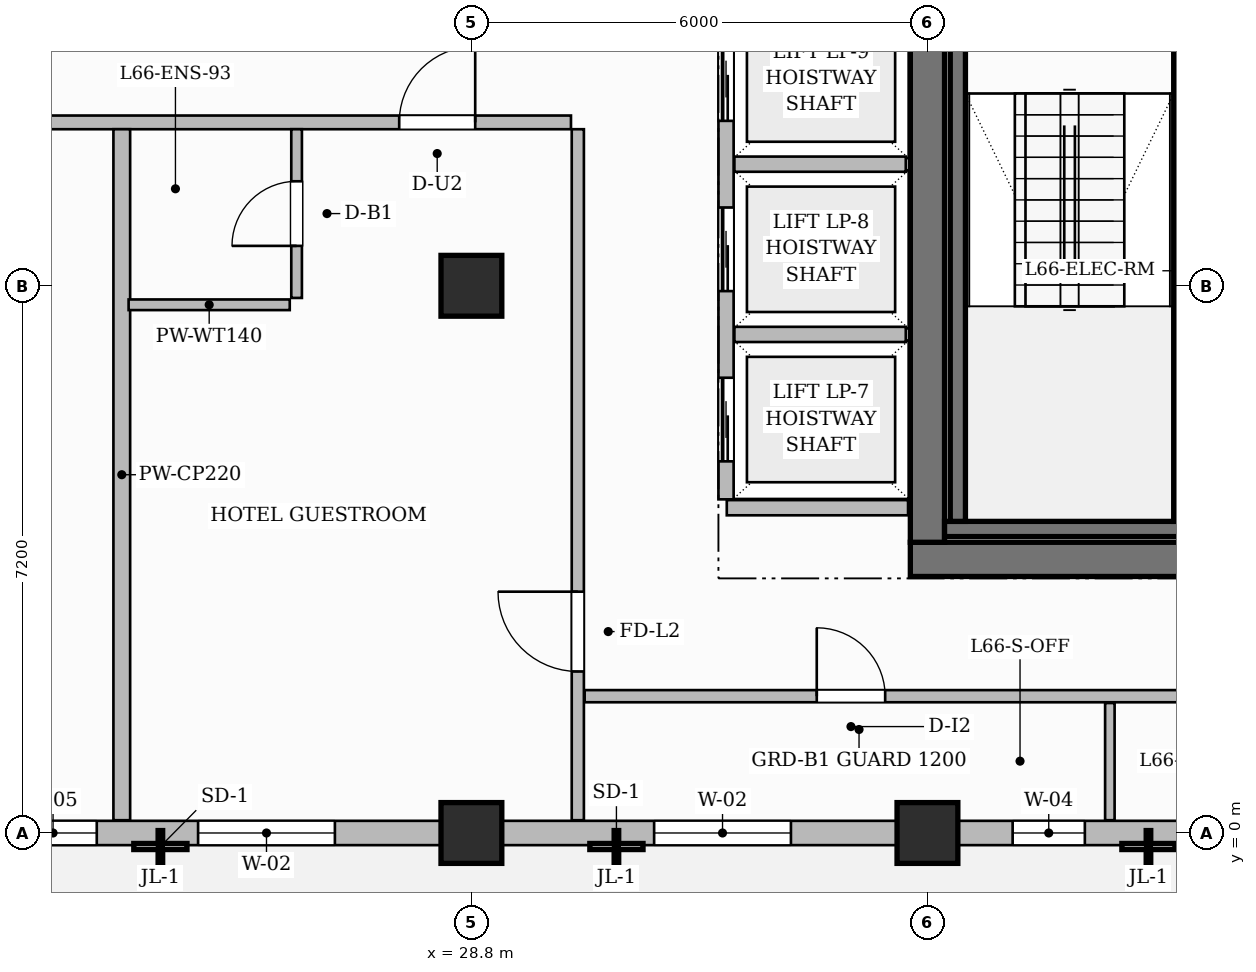
"""IFC4 building model, lengths in metres.
Left out: names, types, materials, properties, quantities, classifications, styles, units other than length and angle.
Written with IfcOpenShell. Run it as: python <this file> out.ifc"""

import sys

from ifc_helpers import new_model, si_unit, direction, frame, frame_2d, origin, origin_2d, place, context, subcontext, project, spatial, rectangle, extrude, source, transform, mapped, element, fill, save


model = new_model("IFC4")
c1 = context("Model", 3, precision=1e-05, world=origin(), true_north=direction((0.0, 1.0)))
c2 = subcontext(c1, "Body", "Model", "MODEL_VIEW")
j1 = project(units=[si_unit("LENGTHUNIT", "METRE"), si_unit("PLANEANGLEUNIT", "RADIAN")], contexts=[c1])
p1 = place(None, origin())
s1 = spatial("IfcSite", under=j1, at=p1, CompositionType="ELEMENT")
p2 = place(p1, origin())
s2 = spatial("IfcBuilding", under=s1, at=p2, CompositionType="ELEMENT")
p3 = place(p2, frame((0.0, 0.0, 263.5)))
s3 = spatial("IfcBuildingStorey", under=s2, at=p3, CompositionType="ELEMENT", Elevation=263.5)
p4 = place(p3, frame((34.575, 3.6, 0.0), z_axis=(0.0, 0.0, 1.0), x_axis=(1.0, 0.0, 0.0)))
e1 = element("IfcWall", 1, at=p4, inside=s3, PredefinedType="SHEAR", context=c2, shape_type="SweptSolid", body=[
    extrude(rectangle(XDim=15.45, YDim=0.45, at=frame_2d((7.725, 0.0))), origin(), (0.0, 0.0, 1.0), 3.85),
])
p5 = place(p4, frame((4.425, 0.0, 0.0)))
e2 = element("IfcOpeningElement", 2, at=p5, cuts=e1, PredefinedType="OPENING", context=c2, shape_type="SweptSolid", body=[
    extrude(rectangle(XDim=0.9, YDim=2.1, at=frame_2d((0.45, 1.05))), frame((0.0, 0.235, 0.0), z_axis=(0.0, -1.0, 0.0), x_axis=(1.0, 0.0, 0.0)), (0.0, 0.0, 1.0), 0.47),
])
p6 = place(p4, frame((6.875, 0.0, 0.0)))
e3 = element("IfcOpeningElement", 3, at=p6, cuts=e1, PredefinedType="OPENING", context=c2, shape_type="SweptSolid", body=[
    extrude(rectangle(XDim=0.9, YDim=2.1, at=frame_2d((0.45, 1.05))), frame((0.0, 0.235, 0.0), z_axis=(0.0, -1.0, 0.0), x_axis=(1.0, 0.0, 0.0)), (0.0, 0.0, 1.0), 0.47),
])
p7 = place(p3, frame((34.8, 3.825, 0.0), z_axis=(0.0, 0.0, 1.0), x_axis=(0.0, 1.0, 0.0)))
e4 = element("IfcWall", 4, at=p7, inside=s3, PredefinedType="SHEAR", context=c2, shape_type="SweptSolid", body=[
    extrude(rectangle(XDim=10.35, YDim=0.45, at=frame_2d((5.175, 0.0))), origin(), (0.0, 0.0, 1.0), 3.85),
])
m1 = source(origin(), c2, "Body", "SweptSolid", [
    extrude(rectangle(XDim=0.8, YDim=0.8, at=origin_2d()), origin(), (0.0, 0.0, 1.0), 3.85),
])
for number, where, z_axis, x_axis in (
    (5, (28.8, 0.0, 0.0), (0.0, 0.0, 1.0), (1.0, 0.0, 0.0)),
    (6, (28.8, 7.2, 0.0), (0.0, 0.0, 1.0), (1.0, 0.0, 0.0)),
    (7, (34.8, 0.0, 0.0), (0.0, 0.0, 1.0), (1.0, 0.0, 0.0)),
):
    element("IfcColumn", number, at=place(p3, frame(where, z_axis=z_axis, x_axis=x_axis)), inside=s3, PredefinedType="COLUMN", context=c2, shape_type="MappedRepresentation", body=[
        mapped(m1, transform((0.0, 0.0, 0.0), scale=1.0)),
    ])
p8 = place(p3, frame((35.025, 4.0, 0.0), z_axis=(0.0, 0.0, 1.0), x_axis=(1.0, 0.0, 0.0)))
e8 = element("IfcWall", 8, at=p8, inside=s3, PredefinedType="SHEAR", context=c2, shape_type="SweptSolid", body=[
    extrude(rectangle(XDim=3.215, YDim=0.2, at=frame_2d((1.607, 0.0))), origin(), (0.0, 0.0, 1.0), 3.85),
])
for number, where, z_axis, x_axis in (
    (9, (35.2, 4.1, 0.0), (0.0, 0.0, 1.0), (0.0, 1.0, 0.0)),
    (10, (38.14, 4.1, 0.0), (0.0, 0.0, 1.0), (0.0, 1.0, 0.0)),
):
    element("IfcWall", number, at=place(p3, frame(where, z_axis=z_axis, x_axis=x_axis)), inside=s3, PredefinedType="SHEAR", context=c2, shape_type="SweptSolid", body=[
        extrude(rectangle(XDim=6.95, YDim=0.2, at=frame_2d((3.475, 0.0))), origin(), (0.0, 0.0, 1.0), 3.85),
    ])
p9 = place(p3, frame((32.16, 4.28, 0.0), z_axis=(0.0, 0.0, 1.0), x_axis=(1.0, 0.0, 0.0)))
e11 = element("IfcWall", 11, at=p9, inside=s3, PredefinedType="PARTITIONING", context=c2, shape_type="SweptSolid", body=[
    extrude(rectangle(XDim=2.385, YDim=0.2, at=frame_2d((1.192, 0.0))), origin(), (0.0, 0.0, 1.0), 3.6),
])
p10 = place(p3, frame((32.15, 4.39, 0.0), z_axis=(0.0, 0.0, 1.0), x_axis=(0.0, 1.0, 0.0)))
e12 = element("IfcWall", 12, at=p10, inside=s3, PredefinedType="PARTITIONING", context=c2, shape_type="SweptSolid", body=[
    extrude(rectangle(XDim=8.82, YDim=0.2, at=frame_2d((4.41, 0.0))), origin(), (0.0, 0.0, 1.0), 3.6),
])
p11 = place(p10, frame((0.5, 0.0, 0.0)))
e13 = element("IfcOpeningElement", 13, at=p11, cuts=e12, PredefinedType="OPENING", context=c2, shape_type="SweptSolid", body=[
    extrude(rectangle(XDim=1.1, YDim=2.2, at=frame_2d((0.55, 1.1))), frame((0.0, 0.11, 0.0), z_axis=(0.0, -1.0, 0.0), x_axis=(1.0, 0.0, 0.0)), (0.0, 0.0, 1.0), 0.22),
])
p12 = place(p10, frame((2.74, 0.0, 0.0)))
e14 = element("IfcOpeningElement", 14, at=p12, cuts=e12, PredefinedType="OPENING", context=c2, shape_type="SweptSolid", body=[
    extrude(rectangle(XDim=1.1, YDim=2.2, at=frame_2d((0.55, 1.1))), frame((0.0, 0.11, 0.0), z_axis=(0.0, -1.0, 0.0), x_axis=(1.0, 0.0, 0.0)), (0.0, 0.0, 1.0), 0.22),
])
p13 = place(p10, frame((4.98, 0.0, 0.0)))
e15 = element("IfcOpeningElement", 15, at=p13, cuts=e12, PredefinedType="OPENING", context=c2, shape_type="SweptSolid", body=[
    extrude(rectangle(XDim=1.1, YDim=2.2, at=frame_2d((0.55, 1.1))), frame((0.0, 0.11, 0.0), z_axis=(0.0, -1.0, 0.0), x_axis=(1.0, 0.0, 0.0)), (0.0, 0.0, 1.0), 0.22),
])
p14 = place(p10, frame((7.22, 0.0, 0.0)))
e16 = element("IfcOpeningElement", 16, at=p14, cuts=e12, PredefinedType="OPENING", context=c2, shape_type="SweptSolid", body=[
    extrude(rectangle(XDim=1.1, YDim=2.2, at=frame_2d((0.55, 1.1))), frame((0.0, 0.11, 0.0), z_axis=(0.0, -1.0, 0.0), x_axis=(1.0, 0.0, 0.0)), (0.0, 0.0, 1.0), 0.22),
])
for number, where, z_axis, x_axis in (
    (17, (32.26, 6.56, 0.0), (0.0, 0.0, 1.0), (1.0, 0.0, 0.0)),
    (18, (32.26, 8.8, 0.0), (0.0, 0.0, 1.0), (1.0, 0.0, 0.0)),
):
    element("IfcWall", number, at=place(p3, frame(where, z_axis=z_axis, x_axis=x_axis)), inside=s3, PredefinedType="PARTITIONING", context=c2, shape_type="SweptSolid", body=[
        extrude(rectangle(XDim=2.255, YDim=0.2, at=frame_2d((1.127, 0.0))), origin(), (0.0, 0.0, 1.0), 3.6),
    ])
p15 = place(p3, frame((18.168, 9.35, 0.0), z_axis=(0.0, 0.0, 1.0), x_axis=(1.0, 0.0, 0.0)))
e19 = element("IfcWall", 19, at=p15, inside=s3, PredefinedType="PARTITIONING", context=c2, shape_type="SweptSolid", body=[
    extrude(rectangle(XDim=11.942, YDim=0.18, at=frame_2d((5.971, 0.0))), origin(), (0.0, 0.0, 1.0), 3.6),
])
p16 = place(p15, frame((3.632, 0.0, 0.0)))
e20 = element("IfcOpeningElement", 20, at=p16, cuts=e19, PredefinedType="OPENING", context=c2, shape_type="SweptSolid", body=[
    extrude(rectangle(XDim=1.05, YDim=2.25, at=frame_2d((0.525, 1.125))), frame((0.0, 0.1, 0.0), z_axis=(0.0, -1.0, 0.0), x_axis=(1.0, 0.0, 0.0)), (0.0, 0.0, 1.0), 0.2),
])
p17 = place(p15, frame((9.682, 0.0, 0.0)))
e21 = element("IfcOpeningElement", 21, at=p17, cuts=e19, PredefinedType="OPENING", context=c2, shape_type="SweptSolid", body=[
    extrude(rectangle(XDim=1.0, YDim=2.2, at=frame_2d((0.5, 1.1))), frame((0.0, 0.1, 0.0), z_axis=(0.0, -1.0, 0.0), x_axis=(1.0, 0.0, 0.0)), (0.0, 0.0, 1.0), 0.2),
])
p18 = place(p3, frame((30.2, 0.168, 0.0), z_axis=(0.0, 0.0, 1.0), x_axis=(0.0, 1.0, 0.0)))
e22 = element("IfcWall", 22, at=p18, inside=s3, PredefinedType="PARTITIONING", context=c2, shape_type="SweptSolid", body=[
    extrude(rectangle(XDim=9.092, YDim=0.16, at=frame_2d((4.546, 0.0))), origin(), (0.0, 0.0, 1.0), 3.6),
])
p19 = place(p18, frame((1.957, 0.0, 0.0)))
e23 = element("IfcOpeningElement", 23, at=p19, cuts=e22, PredefinedType="OPENING", context=c2, shape_type="SweptSolid", body=[
    extrude(rectangle(XDim=1.05, YDim=2.15, at=frame_2d((0.525, 1.075))), frame((0.0, 0.09, 0.0), z_axis=(0.0, -1.0, 0.0), x_axis=(1.0, 0.0, 0.0)), (0.0, 0.0, 1.0), 0.18),
])
p20 = place(p3, frame((30.29, 1.8, 0.0), z_axis=(0.0, 0.0, 1.0), x_axis=(1.0, 0.0, 0.0)))
e24 = element("IfcWall", 24, at=p20, inside=s3, PredefinedType="PARTITIONING", context=c2, shape_type="SweptSolid", body=[
    extrude(rectangle(XDim=19.37, YDim=0.16, at=frame_2d((9.685, 0.0))), origin(), (0.0, 0.0, 1.0), 3.6),
])
p21 = place(p20, frame((3.054, 0.0, 0.0)))
e25 = element("IfcOpeningElement", 25, at=p21, cuts=e24, PredefinedType="OPENING", context=c2, shape_type="SweptSolid", body=[
    extrude(rectangle(XDim=0.9, YDim=2.15, at=frame_2d((0.45, 1.075))), frame((0.0, 0.09, 0.0), z_axis=(0.0, -1.0, 0.0), x_axis=(1.0, 0.0, 0.0)), (0.0, 0.0, 1.0), 0.18),
])
p22 = place(p20, frame((9.66, 0.0, 0.0)))
e26 = element("IfcOpeningElement", 26, at=p22, cuts=e24, PredefinedType="OPENING", context=c2, shape_type="SweptSolid", body=[
    extrude(rectangle(XDim=0.9, YDim=2.15, at=frame_2d((0.45, 1.075))), frame((0.0, 0.09, 0.0), z_axis=(0.0, -1.0, 0.0), x_axis=(1.0, 0.0, 0.0)), (0.0, 0.0, 1.0), 0.18),
])
p23 = place(p20, frame((15.86, 0.0, 0.0)))
e27 = element("IfcOpeningElement", 27, at=p23, cuts=e24, PredefinedType="OPENING", context=c2, shape_type="SweptSolid", body=[
    extrude(rectangle(XDim=0.9, YDim=2.15, at=frame_2d((0.45, 1.075))), frame((0.0, 0.09, 0.0), z_axis=(0.0, -1.0, 0.0), x_axis=(1.0, 0.0, 0.0)), (0.0, 0.0, 1.0), 0.18),
])
p24 = place(p3, frame((37.2, 0.168, 0.0), z_axis=(0.0, 0.0, 1.0), x_axis=(0.0, 1.0, 0.0)))
e28 = element("IfcWall", 28, at=p24, inside=s3, PredefinedType="PARTITIONING", context=c2, shape_type="SweptSolid", body=[
    extrude(rectangle(XDim=1.542, YDim=0.125, at=frame_2d((0.771, 0.0))), origin(), (0.0, 0.0, 1.0), 3.6),
])
p25 = place(p3, frame((24.2, 0.168, 0.0), z_axis=(0.0, 0.0, 1.0), x_axis=(0.0, 1.0, 0.0)))
e29 = element("IfcWall", 29, at=p25, inside=s3, PredefinedType="PARTITIONING", context=c2, shape_type="SweptSolid", body=[
    extrude(rectangle(XDim=9.092, YDim=0.22, at=frame_2d((4.546, 0.0))), origin(), (0.0, 0.0, 1.0), 3.6),
])
p26 = place(p3, frame((26.5, 7.04, 0.0), z_axis=(0.0, 0.0, 1.0), x_axis=(0.0, 1.0, 0.0)))
e30 = element("IfcWall", 30, at=p26, inside=s3, PredefinedType="PARTITIONING", context=c2, shape_type="SweptSolid", body=[
    extrude(rectangle(XDim=2.22, YDim=0.14, at=frame_2d((1.11, 0.0))), origin(), (0.0, 0.0, 1.0), 3.6),
])
p27 = place(p26, frame((0.685, 0.0, 0.0)))
e31 = element("IfcOpeningElement", 31, at=p27, cuts=e30, PredefinedType="OPENING", context=c2, shape_type="SweptSolid", body=[
    extrude(rectangle(XDim=0.85, YDim=2.1, at=frame_2d((0.425, 1.05))), frame((0.0, 0.08, 0.0), z_axis=(0.0, -1.0, 0.0), x_axis=(1.0, 0.0, 0.0)), (0.0, 0.0, 1.0), 0.16),
])
p28 = place(p3, frame((24.29, 6.95, 0.0), z_axis=(0.0, 0.0, 1.0), x_axis=(1.0, 0.0, 0.0)))
e32 = element("IfcWall", 32, at=p28, inside=s3, PredefinedType="PARTITIONING", context=c2, shape_type="SweptSolid", body=[
    extrude(rectangle(XDim=2.12, YDim=0.14, at=frame_2d((1.06, 0.0))), origin(), (0.0, 0.0, 1.0), 3.185),
])
p29 = place(p3, frame((18.0, 0.0, 0.0), z_axis=(0.0, 0.0, 1.0), x_axis=(1.0, 0.0, 0.0)))
e33 = element("IfcWall", 33, at=p29, inside=s3, PredefinedType="SOLIDWALL", context=c2, shape_type="SweptSolid", body=[
    extrude(rectangle(XDim=31.8, YDim=0.32, at=frame_2d((15.9, 0.0))), origin(), (0.0, 0.0, 1.0), 3.185),
])
p30 = place(p29, frame((0.42, 0.0, 0.0)))
e34 = element("IfcOpeningElement", 34, at=p30, cuts=e33, PredefinedType="OPENING", context=c2, shape_type="SweptSolid", body=[
    extrude(rectangle(XDim=1.2, YDim=2.2, at=frame_2d((0.6, 1.1))), frame((0.0, 0.17, 0.0), z_axis=(0.0, -1.0, 0.0), x_axis=(1.0, 0.0, 0.0)), (0.0, 0.0, 1.0), 0.34),
])
p31 = place(p29, frame((4.721, 0.0, 0.8)))
e35 = element("IfcOpeningElement", 35, at=p31, cuts=e33, PredefinedType="OPENING", context=c2, shape_type="SweptSolid", body=[
    extrude(rectangle(XDim=1.15, YDim=1.8, at=frame_2d((0.575, 0.9))), frame((0.0, 0.17, 0.0), z_axis=(0.0, -1.0, 0.0), x_axis=(1.0, 0.0, 0.0)), (0.0, 0.0, 1.0), 0.34),
])
p32 = place(p29, frame((7.204, 0.0, 0.8)))
e36 = element("IfcOpeningElement", 36, at=p32, cuts=e33, PredefinedType="OPENING", context=c2, shape_type="SweptSolid", body=[
    extrude(rectangle(XDim=1.8, YDim=1.85, at=frame_2d((0.9, 0.925))), frame((0.0, 0.17, 0.0), z_axis=(0.0, -1.0, 0.0), x_axis=(1.0, 0.0, 0.0)), (0.0, 0.0, 1.0), 0.34),
])
p33 = place(p29, frame((13.204, 0.0, 0.8)))
e37 = element("IfcOpeningElement", 37, at=p33, cuts=e33, PredefinedType="OPENING", context=c2, shape_type="SweptSolid", body=[
    extrude(rectangle(XDim=1.8, YDim=1.85, at=frame_2d((0.9, 0.925))), frame((0.0, 0.17, 0.0), z_axis=(0.0, -1.0, 0.0), x_axis=(1.0, 0.0, 0.0)), (0.0, 0.0, 1.0), 0.34),
])
p34 = place(p29, frame((17.921, 0.0, 0.8)))
e38 = element("IfcOpeningElement", 38, at=p34, cuts=e33, PredefinedType="OPENING", context=c2, shape_type="SweptSolid", body=[
    extrude(rectangle(XDim=0.95, YDim=1.75, at=frame_2d((0.475, 0.875))), frame((0.0, 0.17, 0.0), z_axis=(0.0, -1.0, 0.0), x_axis=(1.0, 0.0, 0.0)), (0.0, 0.0, 1.0), 0.34),
])
p35 = place(p29, frame((20.304, 0.0, 0.8)))
e39 = element("IfcOpeningElement", 39, at=p35, cuts=e33, PredefinedType="OPENING", context=c2, shape_type="SweptSolid", body=[
    extrude(rectangle(XDim=1.8, YDim=1.85, at=frame_2d((0.9, 0.925))), frame((0.0, 0.17, 0.0), z_axis=(0.0, -1.0, 0.0), x_axis=(1.0, 0.0, 0.0)), (0.0, 0.0, 1.0), 0.34),
])
p36 = place(p29, frame((26.081, 0.0, 0.8)))
e40 = element("IfcOpeningElement", 40, at=p36, cuts=e33, PredefinedType="OPENING", context=c2, shape_type="SweptSolid", body=[
    extrude(rectangle(XDim=1.8, YDim=1.85, at=frame_2d((0.9, 0.925))), frame((0.0, 0.17, 0.0), z_axis=(0.0, -1.0, 0.0), x_axis=(1.0, 0.0, 0.0)), (0.0, 0.0, 1.0), 0.34),
])
p37 = place(p29, frame((28.727, 0.0, 0.8)))
e41 = element("IfcOpeningElement", 41, at=p37, cuts=e33, PredefinedType="OPENING", context=c2, shape_type="SweptSolid", body=[
    extrude(rectangle(XDim=1.8, YDim=1.85, at=frame_2d((0.9, 0.925))), frame((0.0, 0.17, 0.0), z_axis=(0.0, -1.0, 0.0), x_axis=(1.0, 0.0, 0.0)), (0.0, 0.0, 1.0), 0.34),
])
m2 = source(origin(), c2, "Body", "SweptSolid", [
    extrude(rectangle(XDim=1.05, YDim=2.15, at=frame_2d((0.525, 1.075))), frame((0.0, 0.025, 0.0), z_axis=(0.0, -1.0, 0.0), x_axis=(1.0, 0.0, 0.0)), (0.0, 0.0, 1.0), 0.05),
])
p38 = place(p19, origin())
e42 = element("IfcDoor", 42, at=p38, inside=s3, OperationType="SINGLE_SWING_RIGHT", PredefinedType="DOOR", context=c2, shape_type="MappedRepresentation", body=[
    mapped(m2, transform((0.0, 0.0, 0.0), scale=1.0)),
])
fill(e23, e42)
m3 = source(origin(), c2, "Body", "SweptSolid", [
    extrude(rectangle(XDim=0.9, YDim=2.15, at=frame_2d((0.45, 1.075))), frame((0.0, 0.025, 0.0), z_axis=(0.0, -1.0, 0.0), x_axis=(1.0, 0.0, 0.0)), (0.0, 0.0, 1.0), 0.05),
])
p39 = place(p21, origin())
e43 = element("IfcDoor", 43, at=p39, inside=s3, OperationType="SINGLE_SWING_LEFT", PredefinedType="DOOR", context=c2, shape_type="MappedRepresentation", body=[
    mapped(m3, transform((0.0, 0.0, 0.0), scale=1.0)),
])
fill(e25, e43)
m4 = source(origin(), c2, "Body", "SweptSolid", [
    extrude(rectangle(XDim=0.85, YDim=2.1, at=frame_2d((0.425, 1.05))), frame((0.0, 0.025, 0.0), z_axis=(0.0, -1.0, 0.0), x_axis=(1.0, 0.0, 0.0)), (0.0, 0.0, 1.0), 0.05),
])
p40 = place(p27, origin())
e44 = element("IfcDoor", 44, at=p40, inside=s3, OperationType="SINGLE_SWING_LEFT", PredefinedType="DOOR", context=c2, shape_type="MappedRepresentation", body=[
    mapped(m4, transform((0.0, 0.0, 0.0), scale=1.0)),
])
fill(e31, e44)
m5 = source(origin(), c2, "Body", "SweptSolid", [
    extrude(rectangle(XDim=1.0, YDim=2.2, at=frame_2d((0.5, 1.1))), frame((0.0, 0.025, 0.0), z_axis=(0.0, -1.0, 0.0), x_axis=(1.0, 0.0, 0.0)), (0.0, 0.0, 1.0), 0.05),
])
p41 = place(p17, origin())
e45 = element("IfcDoor", 45, at=p41, inside=s3, OperationType="SINGLE_SWING_RIGHT", PredefinedType="DOOR", context=c2, shape_type="MappedRepresentation", body=[
    mapped(m5, transform((0.0, 0.0, 0.0), scale=1.0)),
])
fill(e21, e45)
m6 = source(origin(), c2, "Body", "SweptSolid", [
    extrude(rectangle(XDim=1.1, YDim=2.2, at=frame_2d((0.55, 1.1))), frame((0.0, 0.025, 0.0), z_axis=(0.0, -1.0, 0.0), x_axis=(1.0, 0.0, 0.0)), (0.0, 0.0, 1.0), 0.05),
])
p42 = place(p11, origin())
e46 = element("IfcDoor", 46, at=p42, inside=s3, OperationType="SLIDING_TO_LEFT", PredefinedType="DOOR", context=c2, shape_type="MappedRepresentation", body=[
    mapped(m6, transform((0.0, 0.0, 0.0), scale=1.0)),
])
fill(e13, e46)
p43 = place(p12, origin())
e47 = element("IfcDoor", 47, at=p43, inside=s3, OperationType="SLIDING_TO_LEFT", PredefinedType="DOOR", context=c2, shape_type="MappedRepresentation", body=[
    mapped(m6, transform((0.0, 0.0, 0.0), scale=1.0)),
])
fill(e14, e47)
p44 = place(p13, origin())
e48 = element("IfcDoor", 48, at=p44, inside=s3, OperationType="SLIDING_TO_LEFT", PredefinedType="DOOR", context=c2, shape_type="MappedRepresentation", body=[
    mapped(m6, transform((0.0, 0.0, 0.0), scale=1.0)),
])
fill(e15, e48)
m7 = source(origin(), c2, "Body", "SweptSolid", [
    extrude(rectangle(XDim=1.15, YDim=1.8, at=frame_2d((0.575, 0.9))), frame((0.0, 0.03, 0.0), z_axis=(0.0, -1.0, 0.0), x_axis=(1.0, 0.0, 0.0)), (0.0, 0.0, 1.0), 0.06),
])
p45 = place(p31, origin())
e49 = element("IfcWindow", 49, at=p45, inside=s3, PartitioningType="SINGLE_PANEL", PredefinedType="WINDOW", context=c2, shape_type="MappedRepresentation", body=[
    mapped(m7, transform((0.0, 0.0, 0.0), scale=1.0)),
])
fill(e35, e49)
m8 = source(origin(), c2, "Body", "SweptSolid", [
    extrude(rectangle(XDim=1.8, YDim=1.85, at=frame_2d((0.9, 0.925))), frame((0.0, 0.03, 0.0), z_axis=(0.0, -1.0, 0.0), x_axis=(1.0, 0.0, 0.0)), (0.0, 0.0, 1.0), 0.06),
])
p46 = place(p32, origin())
e50 = element("IfcWindow", 50, at=p46, inside=s3, PartitioningType="DOUBLE_PANEL_VERTICAL", PredefinedType="WINDOW", context=c2, shape_type="MappedRepresentation", body=[
    mapped(m8, transform((0.0, 0.0, 0.0), scale=1.0)),
])
fill(e36, e50)
p47 = place(p33, origin())
e51 = element("IfcWindow", 51, at=p47, inside=s3, PartitioningType="DOUBLE_PANEL_VERTICAL", PredefinedType="WINDOW", context=c2, shape_type="MappedRepresentation", body=[
    mapped(m8, transform((0.0, 0.0, 0.0), scale=1.0)),
])
fill(e37, e51)
m9 = source(origin(), c2, "Body", "SweptSolid", [
    extrude(rectangle(XDim=0.95, YDim=1.75, at=frame_2d((0.475, 0.875))), frame((0.0, 0.03, 0.0), z_axis=(0.0, -1.0, 0.0), x_axis=(1.0, 0.0, 0.0)), (0.0, 0.0, 1.0), 0.06),
])
p48 = place(p34, origin())
e52 = element("IfcWindow", 52, at=p48, inside=s3, PartitioningType="SINGLE_PANEL", PredefinedType="WINDOW", context=c2, shape_type="MappedRepresentation", body=[
    mapped(m9, transform((0.0, 0.0, 0.0), scale=1.0)),
])
fill(e38, e52)
save(model, sys.argv[1])
